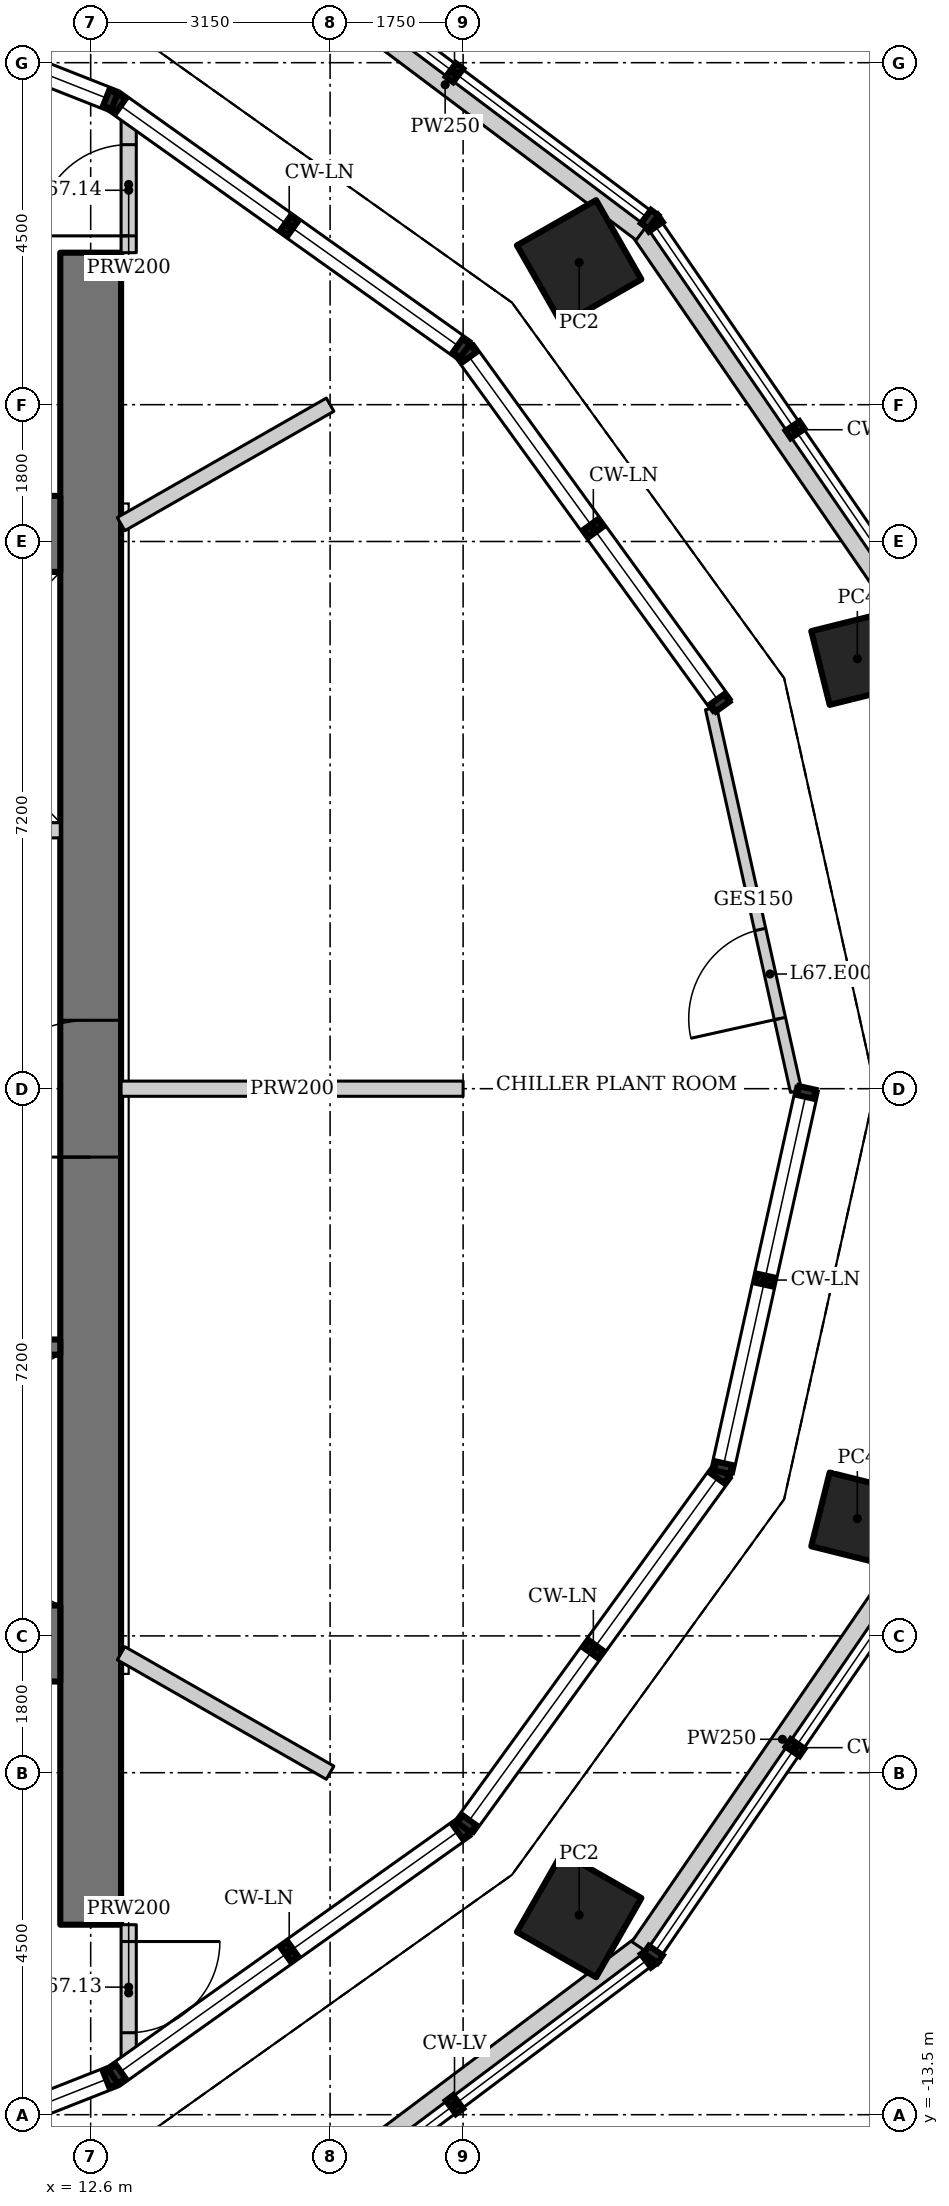
"""IFC4 building model, lengths in metres.
Left out: names, types, materials, properties, quantities, classifications, styles, units other than length and angle.
Written with IfcOpenShell. Run it as: python <this file> out.ifc"""

import sys

from ifc_helpers import new_model, si_unit, direction, frame, frame_2d, origin, origin_2d, place, context, subcontext, project, spatial, rectangle, hollow_rectangle, extrude, element, fill, save


model = new_model("IFC4")
c1 = context("Model", 3, precision=1e-05, world=origin(), true_north=direction((0.0, 1.0)))
c2 = subcontext(c1, "Body", "Model", "MODEL_VIEW")
j1 = project(units=[si_unit("LENGTHUNIT", "METRE"), si_unit("PLANEANGLEUNIT", "RADIAN")], contexts=[c1])
p1 = place(None, origin())
s1 = spatial("IfcSite", under=j1, at=p1, CompositionType="ELEMENT")
p2 = place(p1, origin())
s2 = spatial("IfcBuilding", under=s1, at=p2, CompositionType="ELEMENT")
p3 = place(p2, frame((0.0, 0.0, 290.4)))
s3 = spatial("IfcBuildingStorey", under=s2, at=p3, CompositionType="ELEMENT", Elevation=290.4)
p4 = place(p3, frame((22.687, 5.656, 0.0), z_axis=(0.0, 0.0, 1.0), x_axis=(0.970295726276, 0.2419218956, 0.0)))
e1 = element("IfcColumn", 1, at=p4, inside=s3, PredefinedType="COLUMN", context=c2, shape_type="SweptSolid", body=[
    extrude(hollow_rectangle(XDim=1.0, YDim=1.0, WallThickness=0.08, at=origin_2d()), origin(), (0.0, 0.0, 1.0), 6.3),
])
for number, where, z_axis, x_axis in (
    (2, (19.027, 10.873, 0.0), (0.0, 0.0, 1.0), (0.868, 0.496, 0.0)),
    (3, (19.027, -10.873, 0.0), (0.0, 0.0, 1.0), (0.496, 0.868, 0.0)),
):
    element("IfcColumn", number, at=place(p3, frame(where, z_axis=z_axis, x_axis=x_axis)), inside=s3, PredefinedType="COLUMN", context=c2, shape_type="SweptSolid", body=[
        extrude(hollow_rectangle(XDim=1.2, YDim=1.2, WallThickness=0.1, at=origin_2d()), origin(), (0.0, 0.0, 1.0), 6.3),
    ])
p5 = place(p3, frame((22.687, -5.656, 0.0), z_axis=(0.0, 0.0, 1.0), x_axis=(0.2419218956, 0.970295726276, 0.0)))
e4 = element("IfcColumn", 4, at=p5, inside=s3, PredefinedType="COLUMN", context=c2, shape_type="SweptSolid", body=[
    extrude(hollow_rectangle(XDim=1.0, YDim=1.0, WallThickness=0.08, at=origin_2d()), origin(), (0.0, 0.0, 1.0), 6.3),
])
p6 = place(p3, frame((12.6, -11.0, 0.0), z_axis=(0.0, 0.0, 1.0), x_axis=(0.0, 1.0, 0.0)))
e5 = element("IfcWall", 5, at=p6, inside=s3, PredefinedType="SHEAR", context=c2, shape_type="SweptSolid", body=[
    extrude(rectangle(XDim=22.0, YDim=0.8, at=frame_2d((11.0, 0.0))), origin(), (0.0, 0.0, 1.0), 6.0),
])
p7 = place(p6, frame((10.1, 0.0, 0.0)))
e6 = element("IfcOpeningElement", 6, at=p7, cuts=e5, PredefinedType="OPENING", context=c2, shape_type="SweptSolid", body=[
    extrude(rectangle(XDim=1.8, YDim=2.1, at=frame_2d((0.9, 1.05))), frame((0.0, 0.41, 0.0), z_axis=(0.0, -1.0, 0.0), x_axis=(1.0, 0.0, 0.0)), (0.0, 0.0, 1.0), 0.82),
])
p8 = place(p3, frame((-12.2, -7.3, 0.0), z_axis=(0.0, 0.0, 1.0), x_axis=(1.0, 0.0, 0.0)))
e7 = element("IfcWall", 7, at=p8, inside=s3, PredefinedType="SHEAR", context=c2, shape_type="SweptSolid", body=[
    extrude(rectangle(XDim=24.4, YDim=1.0, at=frame_2d((12.2, 0.0))), origin(), (0.0, 0.0, 1.0), 6.0),
])
p9 = place(p3, frame((12.2, 7.3, 0.0), z_axis=(0.0, 0.0, 1.0), x_axis=(-1.0, 0.0, 0.0)))
e8 = element("IfcWall", 8, at=p9, inside=s3, PredefinedType="SHEAR", context=c2, shape_type="SweptSolid", body=[
    extrude(rectangle(XDim=6.6, YDim=1.0, at=frame_2d((3.3, 0.0))), origin(), (0.0, 0.0, 1.0), 6.0),
])
p10 = place(p3, frame((5.6, -3.4, 0.0), z_axis=(0.0, 0.0, 1.0), x_axis=(1.0, 0.0, 0.0)))
e9 = element("IfcWall", 9, at=p10, inside=s3, PredefinedType="SHEAR", context=c2, shape_type="SweptSolid", body=[
    extrude(rectangle(XDim=6.6, YDim=0.2, at=frame_2d((3.3, 0.0))), origin(), (0.0, 0.0, 1.0), 6.0),
])
p11 = place(p10, frame((5.2, 0.0, 0.0)))
e10 = element("IfcOpeningElement", 10, at=p11, cuts=e9, PredefinedType="OPENING", context=c2, shape_type="SweptSolid", body=[
    extrude(rectangle(XDim=1.2, YDim=2.1, at=frame_2d((0.6, 1.05))), frame((0.0, 0.11, 0.0), z_axis=(0.0, -1.0, 0.0), x_axis=(1.0, 0.0, 0.0)), (0.0, 0.0, 1.0), 0.22),
])
p12 = place(p3, frame((12.2, 3.4, 0.0), z_axis=(0.0, 0.0, 1.0), x_axis=(-1.0, 0.0, 0.0)))
e11 = element("IfcWall", 11, at=p12, inside=s3, PredefinedType="SOLIDWALL", context=c2, shape_type="SweptSolid", body=[
    extrude(rectangle(XDim=6.6, YDim=0.2, at=frame_2d((3.3, 0.0))), origin(), (0.0, 0.0, 1.0), 6.0),
])
p13 = place(p12, frame((4.45, 0.0, 0.0)))
e12 = element("IfcOpeningElement", 12, at=p13, cuts=e11, PredefinedType="OPENING", context=c2, shape_type="SweptSolid", body=[
    extrude(rectangle(XDim=1.1, YDim=2.2, at=frame_2d((0.55, 1.1))), frame((0.0, 0.11, 0.0), z_axis=(0.0, -1.0, 0.0), x_axis=(1.0, 0.0, 0.0)), (0.0, 0.0, 1.0), 0.22),
])
p14 = place(p12, frame((0.9, 0.0, 0.0)))
e13 = element("IfcOpeningElement", 13, at=p14, cuts=e11, PredefinedType="OPENING", context=c2, shape_type="SweptSolid", body=[
    extrude(rectangle(XDim=1.4, YDim=2.2, at=frame_2d((0.7, 1.1))), frame((0.0, 0.11, 0.0), z_axis=(0.0, -1.0, 0.0), x_axis=(1.0, 0.0, 0.0)), (0.0, 0.0, 1.0), 0.22),
])
p15 = place(p3, frame((21.88, -0.032, 0.0), z_axis=(0.0, 0.0, 1.0), x_axis=(-0.216770090684, 0.976222683503, 0.0)))
e14 = element("IfcWall", 14, at=p15, inside=s3, PredefinedType="ELEMENTEDWALL", context=c2, shape_type="SweptSolid", body=[
    extrude(rectangle(XDim=5.158, YDim=0.15, at=frame_2d((2.579, 0.0))), origin(), (0.0, 0.0, 1.0), 6.0),
])
p16 = place(p15, frame((0.979, 0.0, 0.0)))
e15 = element("IfcOpeningElement", 15, at=p16, cuts=e14, PredefinedType="OPENING", context=c2, shape_type="SweptSolid", body=[
    extrude(rectangle(XDim=1.2, YDim=2.4, at=frame_2d((0.6, 1.2))), frame((0.0, 0.085, 0.0), z_axis=(0.0, -1.0, 0.0), x_axis=(1.0, 0.0, 0.0)), (0.0, 0.0, 1.0), 0.17),
])
p17 = place(p3, frame((23.578, 5.826, 0.0), z_axis=(0.0, 0.0, 1.0), x_axis=(-0.565946016037, 0.824442300547, 0.0)))
e16 = element("IfcWall", 16, at=p17, inside=s3, PredefinedType="PARAPET", context=c2, shape_type="SweptSolid", body=[
    extrude(rectangle(XDim=6.633, YDim=0.25, at=frame_2d((3.316, 0.0))), origin(), (0.0, 0.0, 1.0), 1.1),
])
for number, where, z_axis, x_axis in (
    (17, (19.852, 11.266, 0.0), (0.0, 0.0, 1.0), (-0.8, 0.601, 0.0)),
    (18, (14.676, -15.154, 0.0), (0.0, 0.0, 1.0), (0.8, 0.601, 0.0)),
):
    element("IfcWall", number, at=place(p3, frame(where, z_axis=z_axis, x_axis=x_axis)), inside=s3, PredefinedType="PARAPET", context=c2, shape_type="SweptSolid", body=[
        extrude(rectangle(XDim=6.474, YDim=0.25, at=frame_2d((3.237, 0.0))), origin(), (0.0, 0.0, 1.0), 1.1),
    ])
p18 = place(p3, frame((19.824, -11.294, 0.0), z_axis=(0.0, 0.0, 1.0), x_axis=(0.565946016037, 0.824442300547, 0.0)))
e19 = element("IfcWall", 19, at=p18, inside=s3, PredefinedType="PARAPET", context=c2, shape_type="SweptSolid", body=[
    extrude(rectangle(XDim=6.633, YDim=0.25, at=frame_2d((3.316, 0.0))), origin(), (0.0, 0.0, 1.0), 1.1),
])
p19 = place(p3, frame((13.1, -11.0, 0.0), z_axis=(0.0, 0.0, 1.0), x_axis=(0.0, -1.0, 0.0)))
e20 = element("IfcWall", 20, at=p19, inside=s3, PredefinedType="SOLIDWALL", context=c2, shape_type="SweptSolid", body=[
    extrude(rectangle(XDim=1.794, YDim=0.2, at=frame_2d((0.897, 0.0))), origin(), (0.0, 0.0, 1.0), 6.0),
])
p20 = place(p19, frame((0.221, 0.0, 0.0)))
e21 = element("IfcOpeningElement", 21, at=p20, cuts=e20, PredefinedType="OPENING", context=c2, shape_type="SweptSolid", body=[
    extrude(rectangle(XDim=1.2, YDim=2.1, at=frame_2d((0.6, 1.05))), frame((0.0, 0.11, 0.0), z_axis=(0.0, -1.0, 0.0), x_axis=(1.0, 0.0, 0.0)), (0.0, 0.0, 1.0), 0.22),
])
p21 = place(p3, frame((13.1, 11.0, 0.0), z_axis=(0.0, 0.0, 1.0), x_axis=(0.0, 1.0, 0.0)))
e22 = element("IfcWall", 22, at=p21, inside=s3, PredefinedType="SOLIDWALL", context=c2, shape_type="SweptSolid", body=[
    extrude(rectangle(XDim=1.794, YDim=0.2, at=frame_2d((0.897, 0.0))), origin(), (0.0, 0.0, 1.0), 6.0),
])
p22 = place(p21, frame((0.221, 0.0, 0.0)))
e23 = element("IfcOpeningElement", 23, at=p22, cuts=e22, PredefinedType="OPENING", context=c2, shape_type="SweptSolid", body=[
    extrude(rectangle(XDim=1.2, YDim=2.1, at=frame_2d((0.6, 1.05))), frame((0.0, 0.11, 0.0), z_axis=(0.0, -1.0, 0.0), x_axis=(1.0, 0.0, 0.0)), (0.0, 0.0, 1.0), 0.22),
])
p23 = place(p3, frame((13.0, 0.0, 0.0), z_axis=(0.0, 0.0, 1.0), x_axis=(1.0, 0.0, 0.0)))
e24 = element("IfcWall", 24, at=p23, inside=s3, PredefinedType="SOLIDWALL", context=c2, shape_type="SweptSolid", body=[
    extrude(rectangle(XDim=4.5, YDim=0.2, at=frame_2d((2.25, 0.0))), origin(), (0.0, 0.0, 1.0), 6.0),
])
for number, where, z_axis, x_axis in (
    (25, (13.0, 7.428, 0.0), (0.0, 0.0, 1.0), (0.868, 0.496, 0.0)),
    (26, (13.0, -7.428, 0.0), (0.0, 0.0, 1.0), (0.868, -0.496, 0.0)),
):
    element("IfcWall", number, at=place(p3, frame(where, z_axis=z_axis, x_axis=x_axis)), inside=s3, PredefinedType="SOLIDWALL", context=c2, shape_type="SweptSolid", body=[
        extrude(rectangle(XDim=3.167, YDim=0.2, at=frame_2d((1.584, 0.0))), origin(), (0.0, 0.0, 1.0), 6.0),
    ])
p24 = place(p16, origin())
e27 = element("IfcDoor", 27, at=p24, inside=s3, OperationType="DOUBLE_DOOR_DOUBLE_SWING", PredefinedType="DOOR", context=c2, shape_type="SweptSolid", body=[
    extrude(rectangle(XDim=1.2, YDim=2.4, at=frame_2d((0.6, 1.2))), frame((0.0, 0.025, 0.0), z_axis=(0.0, -1.0, 0.0), x_axis=(1.0, 0.0, 0.0)), (0.0, 0.0, 1.0), 0.05),
])
fill(e15, e27)
p25 = place(p7, origin())
e28 = element("IfcDoor", 28, at=p25, inside=s3, OperationType="DOUBLE_DOOR_DOUBLE_SWING", PredefinedType="DOOR", context=c2, shape_type="SweptSolid", body=[
    extrude(rectangle(XDim=1.8, YDim=2.1, at=frame_2d((0.9, 1.05))), frame((0.0, 0.025, 0.0), z_axis=(0.0, -1.0, 0.0), x_axis=(1.0, 0.0, 0.0)), (0.0, 0.0, 1.0), 0.05),
])
fill(e6, e28)
p26 = place(p20, origin())
e29 = element("IfcDoor", 29, at=p26, inside=s3, OperationType="SINGLE_SWING_LEFT", PredefinedType="DOOR", context=c2, shape_type="SweptSolid", body=[
    extrude(rectangle(XDim=1.2, YDim=2.1, at=frame_2d((0.6, 1.05))), frame((0.0, 0.025, 0.0), z_axis=(0.0, -1.0, 0.0), x_axis=(1.0, 0.0, 0.0)), (0.0, 0.0, 1.0), 0.05),
])
fill(e21, e29)
p27 = place(p22, origin())
e30 = element("IfcDoor", 30, at=p27, inside=s3, OperationType="SINGLE_SWING_LEFT", PredefinedType="DOOR", context=c2, shape_type="SweptSolid", body=[
    extrude(rectangle(XDim=1.2, YDim=2.1, at=frame_2d((0.6, 1.05))), frame((0.0, 0.025, 0.0), z_axis=(0.0, -1.0, 0.0), x_axis=(1.0, 0.0, 0.0)), (0.0, 0.0, 1.0), 0.05),
])
fill(e23, e30)
save(model, sys.argv[1])
